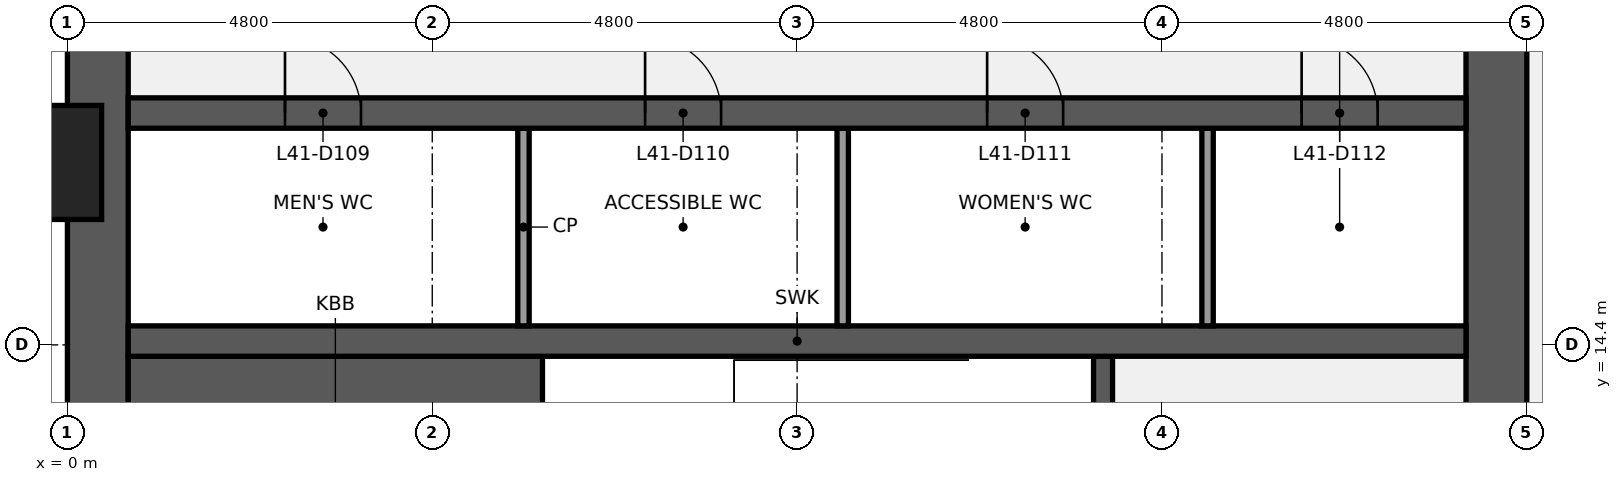
"""IFC4 building model, lengths in metres.
Left out: names, types, materials, properties, quantities, classifications, styles, units other than length and angle.
Written with IfcOpenShell. Run it as: python <this file> out.ifc"""

import sys

from ifc_helpers import new_model, si_unit, direction, frame, frame_2d, origin, origin_2d, place, context, subcontext, project, spatial, rectangle, extrude, element, fill, save


model = new_model("IFC4")
c1 = context("Model", 3, precision=1e-05, world=origin(), true_north=direction((0.0, 1.0)))
c2 = subcontext(c1, "Body", "Model", "MODEL_VIEW")
j1 = project(units=[si_unit("LENGTHUNIT", "METRE"), si_unit("PLANEANGLEUNIT", "RADIAN")], contexts=[c1])
p1 = place(None, origin())
s1 = spatial("IfcSite", under=j1, at=p1, CompositionType="ELEMENT")
p2 = place(p1, origin())
s2 = spatial("IfcBuilding", under=s1, at=p2, CompositionType="ELEMENT")
p3 = place(p2, frame((0.0, 0.0, 193.2)))
s3 = spatial("IfcBuildingStorey", under=s2, at=p3, CompositionType="ELEMENT", Elevation=193.2)
p4 = place(p3, frame((0.4, 9.6, 0.0), z_axis=(0.0, 0.0, 1.0), x_axis=(0.0, 1.0, 0.0)))
e1 = element("IfcWall", 1, at=p4, inside=s3, PredefinedType="SHEAR", context=c2, shape_type="SweptSolid", body=[
    extrude(rectangle(XDim=28.8, YDim=0.8, at=frame_2d((14.4, 0.0))), origin(), (0.0, 0.0, 1.0), 3.84),
])
p5 = place(p4, frame((8.85, 0.0, 0.9)))
e2 = element("IfcOpeningElement", 2, at=p5, cuts=e1, PredefinedType="OPENING", context=c2, shape_type="SweptSolid", body=[
    extrude(rectangle(XDim=1.5, YDim=1.5, at=frame_2d((0.75, 0.75))), frame((0.0, 0.41, 0.0), z_axis=(0.0, -1.0, 0.0), x_axis=(1.0, 0.0, 0.0)), (0.0, 0.0, 1.0), 0.82),
])
p6 = place(p4, frame((18.45, 0.0, 0.9)))
e3 = element("IfcOpeningElement", 3, at=p6, cuts=e1, PredefinedType="OPENING", context=c2, shape_type="SweptSolid", body=[
    extrude(rectangle(XDim=1.5, YDim=1.5, at=frame_2d((0.75, 0.75))), frame((0.0, 0.41, 0.0), z_axis=(0.0, -1.0, 0.0), x_axis=(1.0, 0.0, 0.0)), (0.0, 0.0, 1.0), 0.82),
])
p7 = place(p3, frame((18.8, 38.4, 0.0), z_axis=(0.0, 0.0, 1.0), x_axis=(0.0, -1.0, 0.0)))
e4 = element("IfcWall", 4, at=p7, inside=s3, PredefinedType="SHEAR", context=c2, shape_type="SweptSolid", body=[
    extrude(rectangle(XDim=28.8, YDim=0.8, at=frame_2d((14.4, 0.0))), origin(), (0.0, 0.0, 1.0), 3.84),
])
p8 = place(p7, frame((18.3, 0.0, 0.0)))
e5 = element("IfcOpeningElement", 5, at=p8, cuts=e4, PredefinedType="OPENING", context=c2, shape_type="SweptSolid", body=[
    extrude(rectangle(XDim=1.8, YDim=2.1, at=frame_2d((0.9, 1.05))), frame((0.0, 0.41, 0.0), z_axis=(0.0, -1.0, 0.0), x_axis=(1.0, 0.0, 0.0)), (0.0, 0.0, 1.0), 0.82),
])
p9 = place(p7, frame((8.7, 0.0, 0.0)))
e6 = element("IfcOpeningElement", 6, at=p9, cuts=e4, PredefinedType="OPENING", context=c2, shape_type="SweptSolid", body=[
    extrude(rectangle(XDim=1.8, YDim=2.1, at=frame_2d((0.9, 1.05))), frame((0.0, 0.41, 0.0), z_axis=(0.0, -1.0, 0.0), x_axis=(1.0, 0.0, 0.0)), (0.0, 0.0, 1.0), 0.82),
])
p10 = place(p3, frame((0.8, 12.325, 0.0), z_axis=(0.0, 0.0, 1.0), x_axis=(1.0, 0.0, 0.0)))
e7 = element("IfcWall", 7, at=p10, inside=s3, PredefinedType="SHEAR", context=c2, shape_type="SweptSolid", body=[
    extrude(rectangle(XDim=5.45, YDim=3.85, at=frame_2d((2.725, 0.0))), origin(), (0.0, 0.0, 1.0), 3.84),
])
p11 = place(p3, frame((13.625, 10.8, 0.0), z_axis=(0.0, 0.0, 1.0), x_axis=(0.0, 1.0, 0.0)))
e8 = element("IfcWall", 8, at=p11, inside=s3, PredefinedType="SHEAR", context=c2, shape_type="SweptSolid", body=[
    extrude(rectangle(XDim=3.45, YDim=0.25, at=frame_2d((1.725, 0.0))), origin(), (0.0, 0.0, 1.0), 3.84),
])
p12 = place(p11, frame((1.175, 0.0, 0.0)))
e9 = element("IfcOpeningElement", 9, at=p12, cuts=e8, PredefinedType="OPENING", context=c2, shape_type="SweptSolid", body=[
    extrude(rectangle(XDim=1.1, YDim=2.1, at=frame_2d((0.55, 1.05))), frame((0.0, 0.135, 0.0), z_axis=(0.0, -1.0, 0.0), x_axis=(1.0, 0.0, 0.0)), (0.0, 0.0, 1.0), 0.27),
])
p13 = place(p3, frame((0.8, 14.45, 0.0), z_axis=(0.0, 0.0, 1.0), x_axis=(1.0, 0.0, 0.0)))
e10 = element("IfcWall", 10, at=p13, inside=s3, PredefinedType="SHEAR", context=c2, shape_type="SweptSolid", body=[
    extrude(rectangle(XDim=17.6, YDim=0.4, at=frame_2d((8.8, 0.0))), origin(), (0.0, 0.0, 1.0), 3.84),
])
for number, where, z_axis, x_axis in (
    (11, (6.0, 14.65, 0.0), (0.0, 0.0, 1.0), (0.0, 1.0, 0.0)),
    (12, (10.2, 14.65, 0.0), (0.0, 0.0, 1.0), (0.0, 1.0, 0.0)),
    (13, (15.0, 14.65, 0.0), (0.0, 0.0, 1.0), (0.0, 1.0, 0.0)),
):
    element("IfcWall", number, at=place(p3, frame(where, z_axis=z_axis, x_axis=x_axis)), inside=s3, PredefinedType="PARTITIONING", context=c2, shape_type="SweptSolid", body=[
        extrude(rectangle(XDim=2.6, YDim=0.15, at=frame_2d((1.3, 0.0))), origin(), (0.0, 0.0, 1.0), 3.84),
    ])
p14 = place(p3, frame((0.8, 17.45, 0.0), z_axis=(0.0, 0.0, 1.0), x_axis=(1.0, 0.0, 0.0)))
e14 = element("IfcWall", 14, at=p14, inside=s3, PredefinedType="SHEAR", context=c2, shape_type="SweptSolid", body=[
    extrude(rectangle(XDim=17.6, YDim=0.4, at=frame_2d((8.8, 0.0))), origin(), (0.0, 0.0, 1.0), 3.84),
])
p15 = place(p14, frame((2.062, 0.0, 0.0)))
e15 = element("IfcOpeningElement", 15, at=p15, cuts=e14, PredefinedType="OPENING", context=c2, shape_type="SweptSolid", body=[
    extrude(rectangle(XDim=1.0, YDim=2.1, at=frame_2d((0.5, 1.05))), frame((0.0, 0.21, 0.0), z_axis=(0.0, -1.0, 0.0), x_axis=(1.0, 0.0, 0.0)), (0.0, 0.0, 1.0), 0.42),
])
p16 = place(p14, frame((6.8, 0.0, 0.0)))
e16 = element("IfcOpeningElement", 16, at=p16, cuts=e14, PredefinedType="OPENING", context=c2, shape_type="SweptSolid", body=[
    extrude(rectangle(XDim=1.0, YDim=2.1, at=frame_2d((0.5, 1.05))), frame((0.0, 0.21, 0.0), z_axis=(0.0, -1.0, 0.0), x_axis=(1.0, 0.0, 0.0)), (0.0, 0.0, 1.0), 0.42),
])
p17 = place(p14, frame((11.3, 0.0, 0.0)))
e17 = element("IfcOpeningElement", 17, at=p17, cuts=e14, PredefinedType="OPENING", context=c2, shape_type="SweptSolid", body=[
    extrude(rectangle(XDim=1.0, YDim=2.1, at=frame_2d((0.5, 1.05))), frame((0.0, 0.21, 0.0), z_axis=(0.0, -1.0, 0.0), x_axis=(1.0, 0.0, 0.0)), (0.0, 0.0, 1.0), 0.42),
])
p18 = place(p14, frame((15.438, 0.0, 0.0)))
e18 = element("IfcOpeningElement", 18, at=p18, cuts=e14, PredefinedType="OPENING", context=c2, shape_type="SweptSolid", body=[
    extrude(rectangle(XDim=1.0, YDim=2.1, at=frame_2d((0.5, 1.05))), frame((0.0, 0.21, 0.0), z_axis=(0.0, -1.0, 0.0), x_axis=(1.0, 0.0, 0.0)), (0.0, 0.0, 1.0), 0.42),
])
p19 = place(p3, frame((-0.75, 16.8, 0.0), z_axis=(0.0, 0.0, 1.0), x_axis=(0.0, 1.0, 0.0)))
e19 = element("IfcColumn", 19, at=p19, inside=s3, PredefinedType="PILASTER", context=c2, shape_type="SweptSolid", body=[
    extrude(rectangle(XDim=2.4, YDim=1.5, at=origin_2d()), origin(), (0.0, 0.0, 1.0), 4.0),
])
p20 = place(p15, origin())
e20 = element("IfcDoor", 20, at=p20, inside=s3, OperationType="SINGLE_SWING_LEFT", PredefinedType="DOOR", context=c2, shape_type="SweptSolid", body=[
    extrude(rectangle(XDim=1.0, YDim=2.1, at=frame_2d((0.5, 1.05))), frame((0.0, 0.025, 0.0), z_axis=(0.0, -1.0, 0.0), x_axis=(1.0, 0.0, 0.0)), (0.0, 0.0, 1.0), 0.05),
])
fill(e15, e20)
p21 = place(p16, origin())
e21 = element("IfcDoor", 21, at=p21, inside=s3, OperationType="SINGLE_SWING_LEFT", PredefinedType="DOOR", context=c2, shape_type="SweptSolid", body=[
    extrude(rectangle(XDim=1.0, YDim=2.1, at=frame_2d((0.5, 1.05))), frame((0.0, 0.025, 0.0), z_axis=(0.0, -1.0, 0.0), x_axis=(1.0, 0.0, 0.0)), (0.0, 0.0, 1.0), 0.05),
])
fill(e16, e21)
p22 = place(p17, origin())
e22 = element("IfcDoor", 22, at=p22, inside=s3, OperationType="SINGLE_SWING_LEFT", PredefinedType="DOOR", context=c2, shape_type="SweptSolid", body=[
    extrude(rectangle(XDim=1.0, YDim=2.1, at=frame_2d((0.5, 1.05))), frame((0.0, 0.025, 0.0), z_axis=(0.0, -1.0, 0.0), x_axis=(1.0, 0.0, 0.0)), (0.0, 0.0, 1.0), 0.05),
])
fill(e17, e22)
p23 = place(p18, origin())
e23 = element("IfcDoor", 23, at=p23, inside=s3, OperationType="SINGLE_SWING_LEFT", PredefinedType="DOOR", context=c2, shape_type="SweptSolid", body=[
    extrude(rectangle(XDim=1.0, YDim=2.1, at=frame_2d((0.5, 1.05))), frame((0.0, 0.025, 0.0), z_axis=(0.0, -1.0, 0.0), x_axis=(1.0, 0.0, 0.0)), (0.0, 0.0, 1.0), 0.05),
])
fill(e18, e23)
save(model, sys.argv[1])
